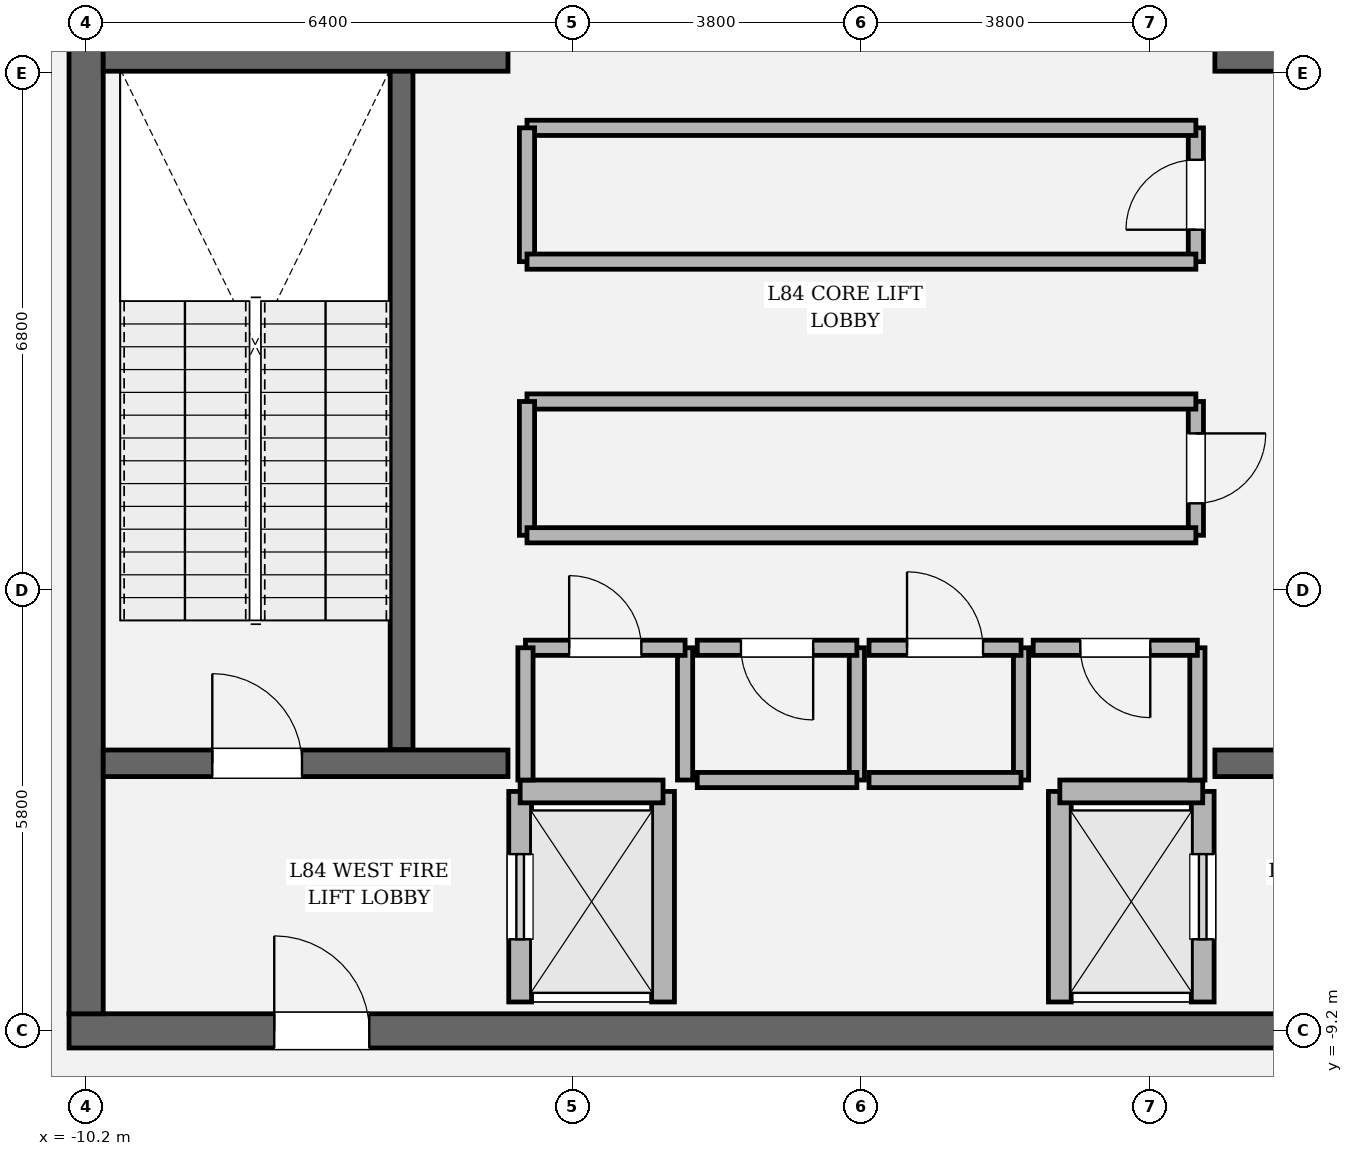
"""IFC4 building model, lengths in metres.
Left out: names, types, materials, properties, quantities, classifications, styles, units other than length and angle.
Written with IfcOpenShell. Run it as: python <this file> out.ifc"""

import sys

from ifc_helpers import new_model, si_unit, direction, frame, frame_2d, origin, place, context, subcontext, project, spatial, rectangle, extrude, element, fill, save


model = new_model("IFC4")
c1 = context("Model", 3, precision=1e-05, world=origin(), true_north=direction((0.0, 1.0)))
c2 = subcontext(c1, "Body", "Model", "MODEL_VIEW")
j1 = project(units=[si_unit("LENGTHUNIT", "METRE"), si_unit("PLANEANGLEUNIT", "RADIAN")], contexts=[c1])
p1 = place(None, origin())
s1 = spatial("IfcSite", under=j1, at=p1, CompositionType="ELEMENT")
p2 = place(p1, origin())
s2 = spatial("IfcBuilding", under=s1, at=p2, CompositionType="ELEMENT")
p3 = place(p2, frame((0.0, 0.0, 357.3)))
s3 = spatial("IfcBuildingStorey", under=s2, at=p3, CompositionType="ELEMENT", Elevation=357.3)
p4 = place(p3, frame((10.425, -9.2, 0.0), z_axis=(0.0, 0.0, 1.0), x_axis=(-1.0, 0.0, 0.0)))
e1 = element("IfcWall", 1, at=p4, inside=s3, PredefinedType="SHEAR", context=c2, shape_type="SweptSolid", body=[
    extrude(rectangle(XDim=20.85, YDim=0.45, at=frame_2d((10.425, 0.0))), origin(), (0.0, 0.0, 1.0), 4.5),
])
p5 = place(p4, frame((2.7, 0.0, 0.0)))
e2 = element("IfcOpeningElement", 2, at=p5, cuts=e1, PredefinedType="OPENING", context=c2, shape_type="SweptSolid", body=[
    extrude(rectangle(XDim=1.25, YDim=2.25, at=frame_2d((0.625, 1.125))), frame((0.0, 0.235, 0.0), z_axis=(0.0, -1.0, 0.0), x_axis=(1.0, 0.0, 0.0)), (0.0, 0.0, 1.0), 0.47),
])
p6 = place(p4, frame((16.9, 0.0, 0.0)))
e3 = element("IfcOpeningElement", 3, at=p6, cuts=e1, PredefinedType="OPENING", context=c2, shape_type="SweptSolid", body=[
    extrude(rectangle(XDim=1.25, YDim=2.25, at=frame_2d((0.625, 1.125))), frame((0.0, 0.235, 0.0), z_axis=(0.0, -1.0, 0.0), x_axis=(1.0, 0.0, 0.0)), (0.0, 0.0, 1.0), 0.47),
])
p7 = place(p3, frame((-10.2, -8.975, 0.0), z_axis=(0.0, 0.0, 1.0), x_axis=(0.0, 1.0, 0.0)))
e4 = element("IfcWall", 4, at=p7, inside=s3, PredefinedType="SHEAR", context=c2, shape_type="SweptSolid", body=[
    extrude(rectangle(XDim=17.95, YDim=0.45, at=frame_2d((8.975, 0.0))), origin(), (0.0, 0.0, 1.0), 4.5),
])
p8 = place(p7, frame((12.765, 0.0, 0.0)))
e5 = element("IfcOpeningElement", 5, at=p8, cuts=e4, PredefinedType="OPENING", context=c2, shape_type="SweptSolid", body=[
    extrude(rectangle(XDim=1.18, YDim=2.2, at=frame_2d((0.59, 1.1))), frame((0.0, 0.235, 0.0), z_axis=(0.0, -1.0, 0.0), x_axis=(1.0, 0.0, 0.0)), (0.0, 0.0, 1.0), 0.47),
])
p9 = place(p3, frame((-6.05, -5.5, 0.0), z_axis=(0.0, 0.0, 1.0), x_axis=(0.0, 1.0, 0.0)))
e6 = element("IfcWall", 6, at=p9, inside=s3, PredefinedType="SOLIDWALL", context=c2, shape_type="SweptSolid", body=[
    extrude(rectangle(XDim=8.95, YDim=0.3, at=frame_2d((4.475, 0.0))), origin(), (0.0, 0.0, 1.0), 4.5),
])
p10 = place(p3, frame((-9.975, -5.68, 0.0), z_axis=(0.0, 0.0, 1.0), x_axis=(1.0, 0.0, 0.0)))
e7 = element("IfcWall", 7, at=p10, inside=s3, PredefinedType="SOLIDWALL", context=c2, shape_type="SweptSolid", body=[
    extrude(rectangle(XDim=5.325, YDim=0.35, at=frame_2d((2.663, 0.0))), origin(), (0.0, 0.0, 1.0), 4.5),
])
p11 = place(p10, frame((1.435, 0.0, 0.0)))
e8 = element("IfcOpeningElement", 8, at=p11, cuts=e7, PredefinedType="OPENING", context=c2, shape_type="SweptSolid", body=[
    extrude(rectangle(XDim=1.18, YDim=2.2, at=frame_2d((0.59, 1.1))), frame((0.0, 0.185, 0.0), z_axis=(0.0, -1.0, 0.0), x_axis=(1.0, 0.0, 0.0)), (0.0, 0.0, 1.0), 0.37),
])
p12 = place(p3, frame((4.65, -5.68, 0.0), z_axis=(0.0, 0.0, 1.0), x_axis=(1.0, 0.0, 0.0)))
e9 = element("IfcWall", 9, at=p12, inside=s3, PredefinedType="SOLIDWALL", context=c2, shape_type="SweptSolid", body=[
    extrude(rectangle(XDim=5.325, YDim=0.35, at=frame_2d((2.663, 0.0))), origin(), (0.0, 0.0, 1.0), 4.5),
])
p13 = place(p12, frame((2.71, 0.0, 0.0)))
e10 = element("IfcOpeningElement", 10, at=p13, cuts=e9, PredefinedType="OPENING", context=c2, shape_type="SweptSolid", body=[
    extrude(rectangle(XDim=1.18, YDim=2.2, at=frame_2d((0.59, 1.1))), frame((0.0, 0.185, 0.0), z_axis=(0.0, -1.0, 0.0), x_axis=(1.0, 0.0, 0.0)), (0.0, 0.0, 1.0), 0.37),
])
for number, where, z_axis, x_axis in (
    (11, (-9.975, 3.6, 0.0), (0.0, 0.0, 1.0), (1.0, 0.0, 0.0)),
    (12, (4.65, 3.6, 0.0), (0.0, 0.0, 1.0), (1.0, 0.0, 0.0)),
):
    element("IfcWall", number, at=place(p3, frame(where, z_axis=z_axis, x_axis=x_axis)), inside=s3, PredefinedType="SOLIDWALL", context=c2, shape_type="SweptSolid", body=[
        extrude(rectangle(XDim=5.325, YDim=0.35, at=frame_2d((2.663, 0.0))), origin(), (0.0, 0.0, 1.0), 4.5),
    ])
p14 = place(p3, frame((-4.49, -8.82, 0.0), z_axis=(0.0, 0.0, 1.0), x_axis=(0.0, 1.0, 0.0)))
e13 = element("IfcWall", 13, at=p14, inside=s3, PredefinedType="SOLIDWALL", context=c2, shape_type="SweptSolid", body=[
    extrude(rectangle(XDim=2.77, YDim=0.3, at=frame_2d((1.385, 0.0))), origin(), (0.0, 0.0, 1.0), 4.22),
])
p15 = place(p14, frame((0.825, 0.0, 0.0)))
e14 = element("IfcOpeningElement", 14, at=p15, cuts=e13, PredefinedType="OPENING", context=c2, shape_type="SweptSolid", body=[
    extrude(rectangle(XDim=1.12, YDim=2.25, at=frame_2d((0.56, 1.125))), frame((0.0, 0.16, 0.0), z_axis=(0.0, -1.0, 0.0), x_axis=(1.0, 0.0, 0.0)), (0.0, 0.0, 1.0), 0.32),
])
p16 = place(p3, frame((-2.61, -8.82, 0.0), z_axis=(0.0, 0.0, 1.0), x_axis=(0.0, 1.0, 0.0)))
e15 = element("IfcWall", 15, at=p16, inside=s3, PredefinedType="SOLIDWALL", context=c2, shape_type="SweptSolid", body=[
    extrude(rectangle(XDim=2.77, YDim=0.3, at=frame_2d((1.385, 0.0))), origin(), (0.0, 0.0, 1.0), 4.22),
])
p17 = place(p3, frame((-4.49, -6.05, 0.0), z_axis=(0.0, 0.0, 1.0), x_axis=(1.0, 0.0, 0.0)))
e16 = element("IfcWall", 16, at=p17, inside=s3, PredefinedType="SOLIDWALL", context=c2, shape_type="SweptSolid", body=[
    extrude(rectangle(XDim=1.88, YDim=0.3, at=frame_2d((0.94, 0.0))), origin(), (0.0, 0.0, 1.0), 4.22),
])
p18 = place(p3, frame((4.49, -8.82, 0.0), z_axis=(0.0, 0.0, 1.0), x_axis=(0.0, 1.0, 0.0)))
e17 = element("IfcWall", 17, at=p18, inside=s3, PredefinedType="SOLIDWALL", context=c2, shape_type="SweptSolid", body=[
    extrude(rectangle(XDim=2.77, YDim=0.3, at=frame_2d((1.385, 0.0))), origin(), (0.0, 0.0, 1.0), 4.22),
])
p19 = place(p18, frame((0.825, 0.0, 0.0)))
e18 = element("IfcOpeningElement", 18, at=p19, cuts=e17, PredefinedType="OPENING", context=c2, shape_type="SweptSolid", body=[
    extrude(rectangle(XDim=1.12, YDim=2.25, at=frame_2d((0.56, 1.125))), frame((0.0, 0.16, 0.0), z_axis=(0.0, -1.0, 0.0), x_axis=(1.0, 0.0, 0.0)), (0.0, 0.0, 1.0), 0.32),
])
p20 = place(p3, frame((2.61, -8.82, 0.0), z_axis=(0.0, 0.0, 1.0), x_axis=(0.0, 1.0, 0.0)))
e19 = element("IfcWall", 19, at=p20, inside=s3, PredefinedType="SOLIDWALL", context=c2, shape_type="SweptSolid", body=[
    extrude(rectangle(XDim=2.77, YDim=0.3, at=frame_2d((1.385, 0.0))), origin(), (0.0, 0.0, 1.0), 4.22),
])
p21 = place(p3, frame((2.61, -6.05, 0.0), z_axis=(0.0, 0.0, 1.0), x_axis=(1.0, 0.0, 0.0)))
e20 = element("IfcWall", 20, at=p21, inside=s3, PredefinedType="SOLIDWALL", context=c2, shape_type="SweptSolid", body=[
    extrude(rectangle(XDim=1.88, YDim=0.3, at=frame_2d((0.94, 0.0))), origin(), (0.0, 0.0, 1.0), 4.22),
])
p22 = place(p3, frame((-2.32, -5.9, 0.0), z_axis=(0.0, 0.0, 1.0), x_axis=(0.0, 1.0, 0.0)))
e21 = element("IfcWall", 21, at=p22, inside=s3, PredefinedType="SOLIDWALL", context=c2, shape_type="SweptSolid", body=[
    extrude(rectangle(XDim=1.74, YDim=0.2, at=frame_2d((0.87, 0.0))), origin(), (0.0, 0.0, 1.0), 4.22),
])
p23 = place(p3, frame((-2.32, -4.16, 0.0), z_axis=(0.0, 0.0, 1.0), x_axis=(-1.0, 0.0, 0.0)))
e22 = element("IfcWall", 22, at=p23, inside=s3, PredefinedType="SOLIDWALL", context=c2, shape_type="SweptSolid", body=[
    extrude(rectangle(XDim=2.1, YDim=0.2, at=frame_2d((1.05, 0.0))), origin(), (0.0, 0.0, 1.0), 4.22),
])
p24 = place(p23, frame((0.575, 0.0, 0.0)))
e23 = element("IfcOpeningElement", 23, at=p24, cuts=e22, PredefinedType="OPENING", context=c2, shape_type="SweptSolid", body=[
    extrude(rectangle(XDim=0.95, YDim=2.15, at=frame_2d((0.475, 1.075))), frame((0.0, 0.11, 0.0), z_axis=(0.0, -1.0, 0.0), x_axis=(1.0, 0.0, 0.0)), (0.0, 0.0, 1.0), 0.22),
])
for number, where, z_axis, x_axis in (
    (24, (-4.42, -4.16, 0.0), (0.0, 0.0, 1.0), (0.0, -1.0, 0.0)),
    (25, (-0.06, -5.9, 0.0), (0.0, 0.0, 1.0), (0.0, 1.0, 0.0)),
):
    element("IfcWall", number, at=place(p3, frame(where, z_axis=z_axis, x_axis=x_axis)), inside=s3, PredefinedType="SOLIDWALL", context=c2, shape_type="SweptSolid", body=[
        extrude(rectangle(XDim=1.74, YDim=0.2, at=frame_2d((0.87, 0.0))), origin(), (0.0, 0.0, 1.0), 4.22),
    ])
p25 = place(p3, frame((-0.06, -4.16, 0.0), z_axis=(0.0, 0.0, 1.0), x_axis=(-1.0, 0.0, 0.0)))
e26 = element("IfcWall", 26, at=p25, inside=s3, PredefinedType="SOLIDWALL", context=c2, shape_type="SweptSolid", body=[
    extrude(rectangle(XDim=2.1, YDim=0.2, at=frame_2d((1.05, 0.0))), origin(), (0.0, 0.0, 1.0), 4.22),
])
p26 = place(p25, frame((0.575, 0.0, 0.0)))
e27 = element("IfcOpeningElement", 27, at=p26, cuts=e26, PredefinedType="OPENING", context=c2, shape_type="SweptSolid", body=[
    extrude(rectangle(XDim=0.95, YDim=2.15, at=frame_2d((0.475, 1.075))), frame((0.0, 0.11, 0.0), z_axis=(0.0, -1.0, 0.0), x_axis=(1.0, 0.0, 0.0)), (0.0, 0.0, 1.0), 0.22),
])
p27 = place(p3, frame((-2.16, -5.9, 0.0), z_axis=(0.0, 0.0, 1.0), x_axis=(1.0, 0.0, 0.0)))
e28 = element("IfcWall", 28, at=p27, inside=s3, PredefinedType="SOLIDWALL", context=c2, shape_type="SweptSolid", body=[
    extrude(rectangle(XDim=2.1, YDim=0.2, at=frame_2d((1.05, 0.0))), origin(), (0.0, 0.0, 1.0), 4.22),
])
p28 = place(p3, frame((2.1, -5.9, 0.0), z_axis=(0.0, 0.0, 1.0), x_axis=(0.0, 1.0, 0.0)))
e29 = element("IfcWall", 29, at=p28, inside=s3, PredefinedType="SOLIDWALL", context=c2, shape_type="SweptSolid", body=[
    extrude(rectangle(XDim=1.74, YDim=0.2, at=frame_2d((0.87, 0.0))), origin(), (0.0, 0.0, 1.0), 4.22),
])
p29 = place(p3, frame((2.1, -4.16, 0.0), z_axis=(0.0, 0.0, 1.0), x_axis=(-1.0, 0.0, 0.0)))
e30 = element("IfcWall", 30, at=p29, inside=s3, PredefinedType="SOLIDWALL", context=c2, shape_type="SweptSolid", body=[
    extrude(rectangle(XDim=2.0, YDim=0.2, at=frame_2d((1.0, 0.0))), origin(), (0.0, 0.0, 1.0), 4.22),
])
p30 = place(p29, frame((0.5, 0.0, 0.0)))
e31 = element("IfcOpeningElement", 31, at=p30, cuts=e30, PredefinedType="OPENING", context=c2, shape_type="SweptSolid", body=[
    extrude(rectangle(XDim=1.0, YDim=2.15, at=frame_2d((0.5, 1.075))), frame((0.0, 0.11, 0.0), z_axis=(0.0, -1.0, 0.0), x_axis=(1.0, 0.0, 0.0)), (0.0, 0.0, 1.0), 0.22),
])
p31 = place(p3, frame((0.1, -5.9, 0.0), z_axis=(0.0, 0.0, 1.0), x_axis=(1.0, 0.0, 0.0)))
e32 = element("IfcWall", 32, at=p31, inside=s3, PredefinedType="SOLIDWALL", context=c2, shape_type="SweptSolid", body=[
    extrude(rectangle(XDim=2.0, YDim=0.2, at=frame_2d((1.0, 0.0))), origin(), (0.0, 0.0, 1.0), 4.22),
])
p32 = place(p3, frame((4.42, -5.9, 0.0), z_axis=(0.0, 0.0, 1.0), x_axis=(0.0, 1.0, 0.0)))
e33 = element("IfcWall", 33, at=p32, inside=s3, PredefinedType="SOLIDWALL", context=c2, shape_type="SweptSolid", body=[
    extrude(rectangle(XDim=1.74, YDim=0.2, at=frame_2d((0.87, 0.0))), origin(), (0.0, 0.0, 1.0), 4.22),
])
p33 = place(p3, frame((4.42, -4.16, 0.0), z_axis=(0.0, 0.0, 1.0), x_axis=(-1.0, 0.0, 0.0)))
e34 = element("IfcWall", 34, at=p33, inside=s3, PredefinedType="SOLIDWALL", context=c2, shape_type="SweptSolid", body=[
    extrude(rectangle(XDim=2.16, YDim=0.2, at=frame_2d((1.08, 0.0))), origin(), (0.0, 0.0, 1.0), 4.22),
])
p34 = place(p33, frame((0.62, 0.0, 0.0)))
e35 = element("IfcOpeningElement", 35, at=p34, cuts=e34, PredefinedType="OPENING", context=c2, shape_type="SweptSolid", body=[
    extrude(rectangle(XDim=0.92, YDim=2.1, at=frame_2d((0.46, 1.05))), frame((0.0, 0.11, 0.0), z_axis=(0.0, -1.0, 0.0), x_axis=(1.0, 0.0, 0.0)), (0.0, 0.0, 1.0), 0.22),
])
p35 = place(p3, frame((4.4, -2.68, 0.0), z_axis=(0.0, 0.0, 1.0), x_axis=(0.0, 1.0, 0.0)))
e36 = element("IfcWall", 36, at=p35, inside=s3, PredefinedType="SOLIDWALL", context=c2, shape_type="SweptSolid", body=[
    extrude(rectangle(XDim=1.76, YDim=0.2, at=frame_2d((0.88, 0.0))), origin(), (0.0, 0.0, 1.0), 4.22),
])
p36 = place(p35, frame((0.42, 0.0, 0.0)))
e37 = element("IfcOpeningElement", 37, at=p36, cuts=e36, PredefinedType="OPENING", context=c2, shape_type="SweptSolid", body=[
    extrude(rectangle(XDim=0.92, YDim=2.1, at=frame_2d((0.46, 1.05))), frame((0.0, 0.11, 0.0), z_axis=(0.0, -1.0, 0.0), x_axis=(1.0, 0.0, 0.0)), (0.0, 0.0, 1.0), 0.22),
])
p37 = place(p3, frame((4.4, -0.92, 0.0), z_axis=(0.0, 0.0, 1.0), x_axis=(-1.0, 0.0, 0.0)))
e38 = element("IfcWall", 38, at=p37, inside=s3, PredefinedType="SOLIDWALL", context=c2, shape_type="SweptSolid", body=[
    extrude(rectangle(XDim=8.8, YDim=0.2, at=frame_2d((4.4, 0.0))), origin(), (0.0, 0.0, 1.0), 4.22),
])
p38 = place(p3, frame((-4.4, -0.92, 0.0), z_axis=(0.0, 0.0, 1.0), x_axis=(0.0, -1.0, 0.0)))
e39 = element("IfcWall", 39, at=p38, inside=s3, PredefinedType="SOLIDWALL", context=c2, shape_type="SweptSolid", body=[
    extrude(rectangle(XDim=1.76, YDim=0.2, at=frame_2d((0.88, 0.0))), origin(), (0.0, 0.0, 1.0), 4.22),
])
p39 = place(p3, frame((-4.4, -2.68, 0.0), z_axis=(0.0, 0.0, 1.0), x_axis=(1.0, 0.0, 0.0)))
e40 = element("IfcWall", 40, at=p39, inside=s3, PredefinedType="SOLIDWALL", context=c2, shape_type="SweptSolid", body=[
    extrude(rectangle(XDim=8.8, YDim=0.2, at=frame_2d((4.4, 0.0))), origin(), (0.0, 0.0, 1.0), 4.22),
])
p40 = place(p3, frame((4.4, 0.92, 0.0), z_axis=(0.0, 0.0, 1.0), x_axis=(0.0, 1.0, 0.0)))
e41 = element("IfcWall", 41, at=p40, inside=s3, PredefinedType="SOLIDWALL", context=c2, shape_type="SweptSolid", body=[
    extrude(rectangle(XDim=1.76, YDim=0.2, at=frame_2d((0.88, 0.0))), origin(), (0.0, 0.0, 1.0), 4.22),
])
p41 = place(p40, frame((0.42, 0.0, 0.0)))
e42 = element("IfcOpeningElement", 42, at=p41, cuts=e41, PredefinedType="OPENING", context=c2, shape_type="SweptSolid", body=[
    extrude(rectangle(XDim=0.92, YDim=2.1, at=frame_2d((0.46, 1.05))), frame((0.0, 0.11, 0.0), z_axis=(0.0, -1.0, 0.0), x_axis=(1.0, 0.0, 0.0)), (0.0, 0.0, 1.0), 0.22),
])
p42 = place(p3, frame((4.4, 2.68, 0.0), z_axis=(0.0, 0.0, 1.0), x_axis=(-1.0, 0.0, 0.0)))
e43 = element("IfcWall", 43, at=p42, inside=s3, PredefinedType="SOLIDWALL", context=c2, shape_type="SweptSolid", body=[
    extrude(rectangle(XDim=8.8, YDim=0.2, at=frame_2d((4.4, 0.0))), origin(), (0.0, 0.0, 1.0), 4.22),
])
p43 = place(p3, frame((-4.4, 2.68, 0.0), z_axis=(0.0, 0.0, 1.0), x_axis=(0.0, -1.0, 0.0)))
e44 = element("IfcWall", 44, at=p43, inside=s3, PredefinedType="SOLIDWALL", context=c2, shape_type="SweptSolid", body=[
    extrude(rectangle(XDim=1.76, YDim=0.2, at=frame_2d((0.88, 0.0))), origin(), (0.0, 0.0, 1.0), 4.22),
])
p44 = place(p3, frame((-4.4, 0.92, 0.0), z_axis=(0.0, 0.0, 1.0), x_axis=(1.0, 0.0, 0.0)))
e45 = element("IfcWall", 45, at=p44, inside=s3, PredefinedType="SOLIDWALL", context=c2, shape_type="SweptSolid", body=[
    extrude(rectangle(XDim=8.8, YDim=0.2, at=frame_2d((4.4, 0.0))), origin(), (0.0, 0.0, 1.0), 4.22),
])
p45 = place(p11, origin())
e46 = element("IfcDoor", 46, at=p45, inside=s3, OperationType="SINGLE_SWING_LEFT", PredefinedType="DOOR", context=c2, shape_type="SweptSolid", body=[
    extrude(rectangle(XDim=1.18, YDim=2.2, at=frame_2d((0.59, 1.1))), frame((0.0, 0.025, 0.0), z_axis=(0.0, -1.0, 0.0), x_axis=(1.0, 0.0, 0.0)), (0.0, 0.0, 1.0), 0.05),
])
fill(e8, e46)
p46 = place(p6, origin())
e47 = element("IfcDoor", 47, at=p46, inside=s3, OperationType="SINGLE_SWING_RIGHT", PredefinedType="DOOR", context=c2, shape_type="SweptSolid", body=[
    extrude(rectangle(XDim=1.25, YDim=2.25, at=frame_2d((0.625, 1.125))), frame((0.0, 0.025, 0.0), z_axis=(0.0, -1.0, 0.0), x_axis=(1.0, 0.0, 0.0)), (0.0, 0.0, 1.0), 0.05),
])
fill(e3, e47)
p47 = place(p15, origin())
e48 = element("IfcDoor", 48, at=p47, inside=s3, OperationType="SLIDING_TO_LEFT", PredefinedType="DOOR", context=c2, shape_type="SweptSolid", body=[
    extrude(rectangle(XDim=1.12, YDim=2.25, at=frame_2d((0.56, 1.125))), frame((0.0, 0.025, 0.0), z_axis=(0.0, -1.0, 0.0), x_axis=(1.0, 0.0, 0.0)), (0.0, 0.0, 1.0), 0.05),
])
fill(e14, e48)
p48 = place(p19, origin())
e49 = element("IfcDoor", 49, at=p48, inside=s3, OperationType="SLIDING_TO_RIGHT", PredefinedType="DOOR", context=c2, shape_type="SweptSolid", body=[
    extrude(rectangle(XDim=1.12, YDim=2.25, at=frame_2d((0.56, 1.125))), frame((0.0, 0.025, 0.0), z_axis=(0.0, -1.0, 0.0), x_axis=(1.0, 0.0, 0.0)), (0.0, 0.0, 1.0), 0.05),
])
fill(e18, e49)
p49 = place(p24, origin())
e50 = element("IfcDoor", 50, at=p49, inside=s3, OperationType="SINGLE_SWING_RIGHT", PredefinedType="DOOR", context=c2, shape_type="SweptSolid", body=[
    extrude(rectangle(XDim=0.95, YDim=2.15, at=frame_2d((0.475, 1.075))), frame((0.0, 0.025, 0.0), z_axis=(0.0, -1.0, 0.0), x_axis=(1.0, 0.0, 0.0)), (0.0, 0.0, 1.0), 0.05),
])
fill(e23, e50)
p50 = place(p26, origin())
e51 = element("IfcDoor", 51, at=p50, inside=s3, OperationType="SINGLE_SWING_LEFT", PredefinedType="DOOR", context=c2, shape_type="SweptSolid", body=[
    extrude(rectangle(XDim=0.95, YDim=2.15, at=frame_2d((0.475, 1.075))), frame((0.0, 0.025, 0.0), z_axis=(0.0, -1.0, 0.0), x_axis=(1.0, 0.0, 0.0)), (0.0, 0.0, 1.0), 0.05),
])
fill(e27, e51)
p51 = place(p30, origin())
e52 = element("IfcDoor", 52, at=p51, inside=s3, OperationType="SINGLE_SWING_RIGHT", PredefinedType="DOOR", context=c2, shape_type="SweptSolid", body=[
    extrude(rectangle(XDim=1.0, YDim=2.15, at=frame_2d((0.5, 1.075))), frame((0.0, 0.025, 0.0), z_axis=(0.0, -1.0, 0.0), x_axis=(1.0, 0.0, 0.0)), (0.0, 0.0, 1.0), 0.05),
])
fill(e31, e52)
p52 = place(p34, origin())
e53 = element("IfcDoor", 53, at=p52, inside=s3, OperationType="SINGLE_SWING_LEFT", PredefinedType="DOOR", context=c2, shape_type="SweptSolid", body=[
    extrude(rectangle(XDim=0.92, YDim=2.1, at=frame_2d((0.46, 1.05))), frame((0.0, 0.025, 0.0), z_axis=(0.0, -1.0, 0.0), x_axis=(1.0, 0.0, 0.0)), (0.0, 0.0, 1.0), 0.05),
])
fill(e35, e53)
p53 = place(p36, origin())
e54 = element("IfcDoor", 54, at=p53, inside=s3, OperationType="SINGLE_SWING_RIGHT", PredefinedType="DOOR", context=c2, shape_type="SweptSolid", body=[
    extrude(rectangle(XDim=0.92, YDim=2.1, at=frame_2d((0.46, 1.05))), frame((0.0, 0.025, 0.0), z_axis=(0.0, -1.0, 0.0), x_axis=(1.0, 0.0, 0.0)), (0.0, 0.0, 1.0), 0.05),
])
fill(e37, e54)
p54 = place(p41, origin())
e55 = element("IfcDoor", 55, at=p54, inside=s3, OperationType="SINGLE_SWING_LEFT", PredefinedType="DOOR", context=c2, shape_type="SweptSolid", body=[
    extrude(rectangle(XDim=0.92, YDim=2.1, at=frame_2d((0.46, 1.05))), frame((0.0, 0.025, 0.0), z_axis=(0.0, -1.0, 0.0), x_axis=(1.0, 0.0, 0.0)), (0.0, 0.0, 1.0), 0.05),
])
fill(e42, e55)
save(model, sys.argv[1])
